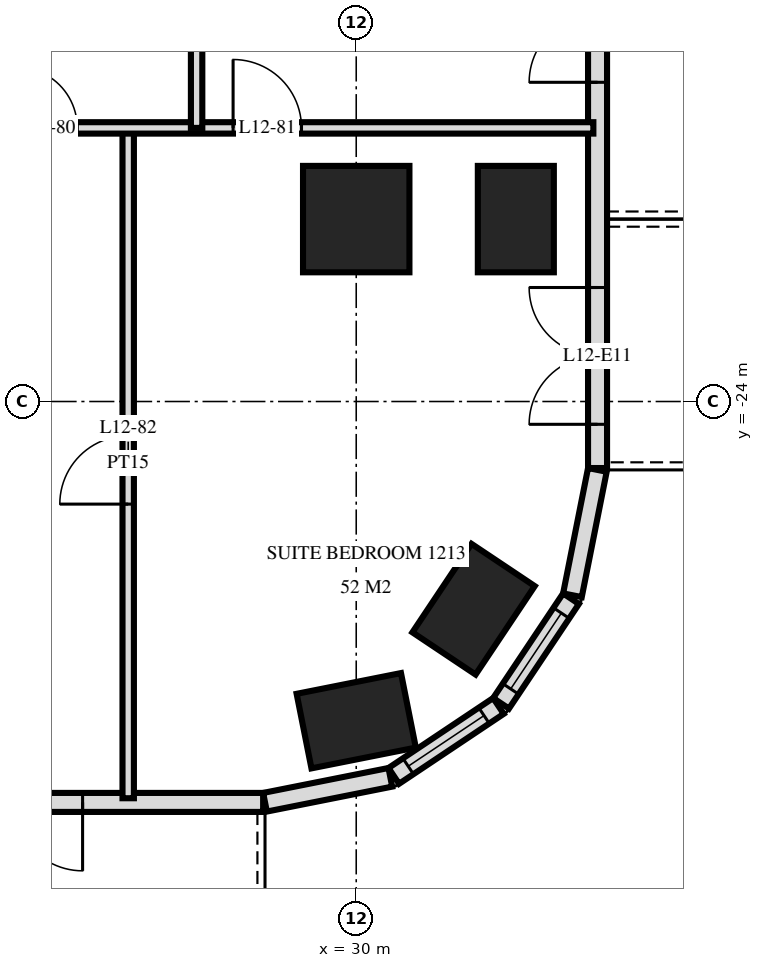
"""IFC4 building model, lengths in metres.
Left out: names, types, materials, properties, quantities, classifications, styles, units other than length and angle.
Written with IfcOpenShell. Run it as: python <this file> out.ifc"""

import sys

from ifc_helpers import new_model, si_unit, direction, frame, frame_2d, origin, origin_2d, place, context, subcontext, project, spatial, rectangle, extrude, element, fill, save


model = new_model("IFC4")
c1 = context("Model", 3, precision=1e-05, world=origin(), true_north=direction((0.0, 1.0)))
c2 = subcontext(c1, "Body", "Model", "MODEL_VIEW")
j1 = project(units=[si_unit("LENGTHUNIT", "METRE"), si_unit("PLANEANGLEUNIT", "RADIAN")], contexts=[c1])
p1 = place(None, origin())
s1 = spatial("IfcSite", under=j1, at=p1, CompositionType="ELEMENT")
p2 = place(p1, origin())
s2 = spatial("IfcBuilding", under=s1, at=p2, CompositionType="ELEMENT")
p3 = place(p2, frame((0.0, 0.0, 52.8)))
s3 = spatial("IfcBuildingStorey", under=s2, at=p3, CompositionType="ELEMENT", Elevation=52.8)
p4 = place(p3, frame((30.0, -28.2, 0.0), z_axis=(0.0, 0.0, 1.0), x_axis=(0.980792089743, 0.195056086032, 0.0)))
e1 = element("IfcColumn", 1, at=p4, inside=s3, PredefinedType="COLUMN", context=c2, shape_type="SweptSolid", body=[
    extrude(rectangle(XDim=1.4, YDim=1.0, at=origin_2d()), origin(), (0.0, 0.0, 1.0), 3.6),
])
p5 = place(p3, frame((30.0, -21.6, 0.0), z_axis=(0.0, 0.0, 1.0), x_axis=(1.0, 0.0, 0.0)))
e2 = element("IfcColumn", 2, at=p5, inside=s3, PredefinedType="COLUMN", context=c2, shape_type="SweptSolid", body=[
    extrude(rectangle(XDim=1.4, YDim=1.4, at=origin_2d()), origin(), (0.0, 0.0, 1.0), 3.6),
])
for number, where, z_axis, x_axis in (
    (3, (31.544, -26.733, 0.0), (0.0, 0.0, 1.0), (0.556, 0.831, 0.0)),
    (4, (32.1, -21.6, 0.0), (0.0, 0.0, 1.0), (0.0, 1.0, 0.0)),
):
    element("IfcColumn", number, at=place(p3, frame(where, z_axis=z_axis, x_axis=x_axis)), inside=s3, PredefinedType="COLUMN", context=c2, shape_type="SweptSolid", body=[
        extrude(rectangle(XDim=1.4, YDim=1.0, at=origin_2d()), origin(), (0.0, 0.0, 1.0), 3.6),
    ])
p6 = place(p3, frame((-28.775, -29.275, 0.0), z_axis=(0.0, 0.0, 1.0), x_axis=(1.0, 0.0, 0.0)))
e5 = element("IfcWall", 5, at=p6, inside=s3, PredefinedType="SOLIDWALL", context=c2, shape_type="SweptSolid", body=[
    extrude(rectangle(XDim=57.551, YDim=0.25, at=frame_2d((28.775, 0.0))), origin(), (0.0, 0.0, 1.0), 3.32),
])
p7 = place(p6, frame((0.575, 0.0, 0.0)))
e6 = element("IfcOpeningElement", 6, at=p7, cuts=e5, PredefinedType="OPENING", context=c2, shape_type="SweptSolid", body=[
    extrude(rectangle(XDim=1.8, YDim=2.4, at=frame_2d((0.9, 1.2))), frame((0.0, 0.135, 0.0), z_axis=(0.0, -1.0, 0.0), x_axis=(1.0, 0.0, 0.0)), (0.0, 0.0, 1.0), 0.27),
])
p8 = place(p6, frame((5.375, 0.0, 0.0)))
e7 = element("IfcOpeningElement", 7, at=p8, cuts=e5, PredefinedType="OPENING", context=c2, shape_type="SweptSolid", body=[
    extrude(rectangle(XDim=1.8, YDim=2.4, at=frame_2d((0.9, 1.2))), frame((0.0, 0.135, 0.0), z_axis=(0.0, -1.0, 0.0), x_axis=(1.0, 0.0, 0.0)), (0.0, 0.0, 1.0), 0.27),
])
p9 = place(p6, frame((8.075, 0.0, 0.3)))
e8 = element("IfcOpeningElement", 8, at=p9, cuts=e5, PredefinedType="OPENING", context=c2, shape_type="SweptSolid", body=[
    extrude(rectangle(XDim=2.4, YDim=2.1, at=frame_2d((1.2, 1.05))), frame((0.0, 0.135, 0.0), z_axis=(0.0, -1.0, 0.0), x_axis=(1.0, 0.0, 0.0)), (0.0, 0.0, 1.0), 0.27),
])
p10 = place(p6, frame((11.375, 0.0, 0.0)))
e9 = element("IfcOpeningElement", 9, at=p10, cuts=e5, PredefinedType="OPENING", context=c2, shape_type="SweptSolid", body=[
    extrude(rectangle(XDim=1.8, YDim=2.4, at=frame_2d((0.9, 1.2))), frame((0.0, 0.135, 0.0), z_axis=(0.0, -1.0, 0.0), x_axis=(1.0, 0.0, 0.0)), (0.0, 0.0, 1.0), 0.27),
])
p11 = place(p6, frame((14.075, 0.0, 0.3)))
e10 = element("IfcOpeningElement", 10, at=p11, cuts=e5, PredefinedType="OPENING", context=c2, shape_type="SweptSolid", body=[
    extrude(rectangle(XDim=2.4, YDim=2.1, at=frame_2d((1.2, 1.05))), frame((0.0, 0.135, 0.0), z_axis=(0.0, -1.0, 0.0), x_axis=(1.0, 0.0, 0.0)), (0.0, 0.0, 1.0), 0.27),
])
p12 = place(p6, frame((17.375, 0.0, 0.0)))
e11 = element("IfcOpeningElement", 11, at=p12, cuts=e5, PredefinedType="OPENING", context=c2, shape_type="SweptSolid", body=[
    extrude(rectangle(XDim=1.8, YDim=2.4, at=frame_2d((0.9, 1.2))), frame((0.0, 0.135, 0.0), z_axis=(0.0, -1.0, 0.0), x_axis=(1.0, 0.0, 0.0)), (0.0, 0.0, 1.0), 0.27),
])
p13 = place(p6, frame((20.075, 0.0, 0.3)))
e12 = element("IfcOpeningElement", 12, at=p13, cuts=e5, PredefinedType="OPENING", context=c2, shape_type="SweptSolid", body=[
    extrude(rectangle(XDim=2.4, YDim=2.1, at=frame_2d((1.2, 1.05))), frame((0.0, 0.135, 0.0), z_axis=(0.0, -1.0, 0.0), x_axis=(1.0, 0.0, 0.0)), (0.0, 0.0, 1.0), 0.27),
])
p14 = place(p6, frame((23.075, 0.0, 0.3)))
e13 = element("IfcOpeningElement", 13, at=p14, cuts=e5, PredefinedType="OPENING", context=c2, shape_type="SweptSolid", body=[
    extrude(rectangle(XDim=2.4, YDim=2.1, at=frame_2d((1.2, 1.05))), frame((0.0, 0.135, 0.0), z_axis=(0.0, -1.0, 0.0), x_axis=(1.0, 0.0, 0.0)), (0.0, 0.0, 1.0), 0.27),
])
p15 = place(p6, frame((26.375, 0.0, 0.0)))
e14 = element("IfcOpeningElement", 14, at=p15, cuts=e5, PredefinedType="OPENING", context=c2, shape_type="SweptSolid", body=[
    extrude(rectangle(XDim=1.8, YDim=2.4, at=frame_2d((0.9, 1.2))), frame((0.0, 0.135, 0.0), z_axis=(0.0, -1.0, 0.0), x_axis=(1.0, 0.0, 0.0)), (0.0, 0.0, 1.0), 0.27),
])
p16 = place(p6, frame((29.375, 0.0, 0.0)))
e15 = element("IfcOpeningElement", 15, at=p16, cuts=e5, PredefinedType="OPENING", context=c2, shape_type="SweptSolid", body=[
    extrude(rectangle(XDim=1.8, YDim=2.4, at=frame_2d((0.9, 1.2))), frame((0.0, 0.135, 0.0), z_axis=(0.0, -1.0, 0.0), x_axis=(1.0, 0.0, 0.0)), (0.0, 0.0, 1.0), 0.27),
])
p17 = place(p6, frame((32.075, 0.0, 0.3)))
e16 = element("IfcOpeningElement", 16, at=p17, cuts=e5, PredefinedType="OPENING", context=c2, shape_type="SweptSolid", body=[
    extrude(rectangle(XDim=2.4, YDim=2.1, at=frame_2d((1.2, 1.05))), frame((0.0, 0.135, 0.0), z_axis=(0.0, -1.0, 0.0), x_axis=(1.0, 0.0, 0.0)), (0.0, 0.0, 1.0), 0.27),
])
p18 = place(p6, frame((35.075, 0.0, 0.3)))
e17 = element("IfcOpeningElement", 17, at=p18, cuts=e5, PredefinedType="OPENING", context=c2, shape_type="SweptSolid", body=[
    extrude(rectangle(XDim=2.4, YDim=2.1, at=frame_2d((1.2, 1.05))), frame((0.0, 0.135, 0.0), z_axis=(0.0, -1.0, 0.0), x_axis=(1.0, 0.0, 0.0)), (0.0, 0.0, 1.0), 0.27),
])
p19 = place(p6, frame((38.375, 0.0, 0.0)))
e18 = element("IfcOpeningElement", 18, at=p19, cuts=e5, PredefinedType="OPENING", context=c2, shape_type="SweptSolid", body=[
    extrude(rectangle(XDim=1.8, YDim=2.4, at=frame_2d((0.9, 1.2))), frame((0.0, 0.135, 0.0), z_axis=(0.0, -1.0, 0.0), x_axis=(1.0, 0.0, 0.0)), (0.0, 0.0, 1.0), 0.27),
])
p20 = place(p6, frame((41.375, 0.0, 0.0)))
e19 = element("IfcOpeningElement", 19, at=p20, cuts=e5, PredefinedType="OPENING", context=c2, shape_type="SweptSolid", body=[
    extrude(rectangle(XDim=1.8, YDim=2.4, at=frame_2d((0.9, 1.2))), frame((0.0, 0.135, 0.0), z_axis=(0.0, -1.0, 0.0), x_axis=(1.0, 0.0, 0.0)), (0.0, 0.0, 1.0), 0.27),
])
p21 = place(p6, frame((44.075, 0.0, 0.3)))
e20 = element("IfcOpeningElement", 20, at=p21, cuts=e5, PredefinedType="OPENING", context=c2, shape_type="SweptSolid", body=[
    extrude(rectangle(XDim=2.4, YDim=2.1, at=frame_2d((1.2, 1.05))), frame((0.0, 0.135, 0.0), z_axis=(0.0, -1.0, 0.0), x_axis=(1.0, 0.0, 0.0)), (0.0, 0.0, 1.0), 0.27),
])
p22 = place(p6, frame((47.075, 0.0, 0.3)))
e21 = element("IfcOpeningElement", 21, at=p22, cuts=e5, PredefinedType="OPENING", context=c2, shape_type="SweptSolid", body=[
    extrude(rectangle(XDim=2.4, YDim=2.1, at=frame_2d((1.2, 1.05))), frame((0.0, 0.135, 0.0), z_axis=(0.0, -1.0, 0.0), x_axis=(1.0, 0.0, 0.0)), (0.0, 0.0, 1.0), 0.27),
])
p23 = place(p6, frame((50.375, 0.0, 0.0)))
e22 = element("IfcOpeningElement", 22, at=p23, cuts=e5, PredefinedType="OPENING", context=c2, shape_type="SweptSolid", body=[
    extrude(rectangle(XDim=1.8, YDim=2.4, at=frame_2d((0.9, 1.2))), frame((0.0, 0.135, 0.0), z_axis=(0.0, -1.0, 0.0), x_axis=(1.0, 0.0, 0.0)), (0.0, 0.0, 1.0), 0.27),
])
p24 = place(p6, frame((53.375, 0.0, 0.0)))
e23 = element("IfcOpeningElement", 23, at=p24, cuts=e5, PredefinedType="OPENING", context=c2, shape_type="SweptSolid", body=[
    extrude(rectangle(XDim=1.8, YDim=2.4, at=frame_2d((0.9, 1.2))), frame((0.0, 0.135, 0.0), z_axis=(0.0, -1.0, 0.0), x_axis=(1.0, 0.0, 0.0)), (0.0, 0.0, 1.0), 0.27),
])
p25 = place(p3, frame((28.8, -29.273, 0.0), z_axis=(0.0, 0.0, 1.0), x_axis=(0.980775640221, 0.19513878023, 0.0)))
e24 = element("IfcWall", 24, at=p25, inside=s3, PredefinedType="SOLIDWALL", context=c2, shape_type="SweptSolid", body=[
    extrude(rectangle(XDim=1.681, YDim=0.25, at=frame_2d((0.841, 0.0))), origin(), (0.0, 0.0, 1.0), 3.32),
])
p26 = place(p3, frame((30.494, -28.926, 0.0), z_axis=(0.0, 0.0, 1.0), x_axis=(0.831482937015, 0.55555029066, 0.0)))
e25 = element("IfcWall", 25, at=p26, inside=s3, PredefinedType="SOLIDWALL", context=c2, shape_type="SweptSolid", body=[
    extrude(rectangle(XDim=1.656, YDim=0.25, at=frame_2d((0.828, 0.0))), origin(), (0.0, 0.0, 1.0), 3.32),
])
p27 = place(p26, frame((0.228, 0.0, 0.9)))
e26 = element("IfcOpeningElement", 26, at=p27, cuts=e25, PredefinedType="OPENING", context=c2, shape_type="SweptSolid", body=[
    extrude(rectangle(XDim=1.2, YDim=1.5, at=frame_2d((0.6, 0.75))), frame((0.0, 0.135, 0.0), z_axis=(0.0, -1.0, 0.0), x_axis=(1.0, 0.0, 0.0)), (0.0, 0.0, 1.0), 0.27),
])
p28 = place(p3, frame((31.906, -27.971, 0.0), z_axis=(0.0, 0.0, 1.0), x_axis=(0.55555029066, 0.831482937015, 0.0)))
e27 = element("IfcWall", 27, at=p28, inside=s3, PredefinedType="SOLIDWALL", context=c2, shape_type="SweptSolid", body=[
    extrude(rectangle(XDim=1.656, YDim=0.25, at=frame_2d((0.828, 0.0))), origin(), (0.0, 0.0, 1.0), 3.32),
])
p29 = place(p28, frame((0.228, 0.0, 0.9)))
e28 = element("IfcOpeningElement", 28, at=p29, cuts=e27, PredefinedType="OPENING", context=c2, shape_type="SweptSolid", body=[
    extrude(rectangle(XDim=1.2, YDim=1.5, at=frame_2d((0.6, 0.75))), frame((0.0, 0.135, 0.0), z_axis=(0.0, -1.0, 0.0), x_axis=(1.0, 0.0, 0.0)), (0.0, 0.0, 1.0), 0.27),
])
p30 = place(p3, frame((32.844, -26.549, 0.0), z_axis=(0.0, 0.0, 1.0), x_axis=(0.195166572128, 0.980770110232, 0.0)))
e29 = element("IfcWall", 29, at=p30, inside=s3, PredefinedType="SOLIDWALL", context=c2, shape_type="SweptSolid", body=[
    extrude(rectangle(XDim=1.681, YDim=0.25, at=frame_2d((0.841, 0.0))), origin(), (0.0, 0.0, 1.0), 3.32),
])
p31 = place(p3, frame((33.175, -24.875, 0.0), z_axis=(0.0, 0.0, 1.0), x_axis=(0.0, 1.0, 0.0)))
e30 = element("IfcWall", 30, at=p31, inside=s3, PredefinedType="SOLIDWALL", context=c2, shape_type="SweptSolid", body=[
    extrude(rectangle(XDim=21.551, YDim=0.25, at=frame_2d((10.775, 0.0))), origin(), (0.0, 0.0, 1.0), 3.32),
])
p32 = place(p31, frame((0.575, 0.0, 0.0)))
e31 = element("IfcOpeningElement", 31, at=p32, cuts=e30, PredefinedType="OPENING", context=c2, shape_type="SweptSolid", body=[
    extrude(rectangle(XDim=1.8, YDim=2.4, at=frame_2d((0.9, 1.2))), frame((0.0, 0.135, 0.0), z_axis=(0.0, -1.0, 0.0), x_axis=(1.0, 0.0, 0.0)), (0.0, 0.0, 1.0), 0.27),
])
p33 = place(p31, frame((5.075, 0.0, 0.0)))
e32 = element("IfcOpeningElement", 32, at=p33, cuts=e30, PredefinedType="OPENING", context=c2, shape_type="SweptSolid", body=[
    extrude(rectangle(XDim=1.8, YDim=2.4, at=frame_2d((0.9, 1.2))), frame((0.0, 0.135, 0.0), z_axis=(0.0, -1.0, 0.0), x_axis=(1.0, 0.0, 0.0)), (0.0, 0.0, 1.0), 0.27),
])
p34 = place(p31, frame((8.075, 0.0, 0.3)))
e33 = element("IfcOpeningElement", 33, at=p34, cuts=e30, PredefinedType="OPENING", context=c2, shape_type="SweptSolid", body=[
    extrude(rectangle(XDim=1.2, YDim=2.1, at=frame_2d((0.6, 1.05))), frame((0.0, 0.135, 0.0), z_axis=(0.0, -1.0, 0.0), x_axis=(1.0, 0.0, 0.0)), (0.0, 0.0, 1.0), 0.27),
])
p35 = place(p31, frame((13.1, 0.0, 0.0)))
e34 = element("IfcOpeningElement", 34, at=p35, cuts=e30, PredefinedType="OPENING", context=c2, shape_type="SweptSolid", body=[
    extrude(rectangle(XDim=1.8, YDim=2.4, at=frame_2d((0.9, 1.2))), frame((0.0, 0.135, 0.0), z_axis=(0.0, -1.0, 0.0), x_axis=(1.0, 0.0, 0.0)), (0.0, 0.0, 1.0), 0.27),
])
p36 = place(p3, frame((27.9, -20.4, 0.0), z_axis=(0.0, 0.0, 1.0), x_axis=(0.0, 1.0, 0.0)))
e35 = element("IfcWall", 35, at=p36, inside=s3, PredefinedType="PARTITIONING", context=c2, shape_type="SweptSolid", body=[
    extrude(rectangle(XDim=3.0, YDim=0.15, at=frame_2d((1.5, 0.0))), origin(), (0.0, 0.0, 1.0), 3.32),
])
p37 = place(p3, frame((27.0, -29.22, 0.0), z_axis=(0.0, 0.0, 1.0), x_axis=(0.0, 1.0, 0.0)))
e36 = element("IfcWall", 36, at=p37, inside=s3, PredefinedType="PARTITIONING", context=c2, shape_type="SweptSolid", body=[
    extrude(rectangle(XDim=8.82, YDim=0.15, at=frame_2d((4.41, 0.0))), origin(), (0.0, 0.0, 1.0), 3.32),
])
p38 = place(p37, frame((3.87, 0.0, 0.0)))
e37 = element("IfcOpeningElement", 37, at=p38, cuts=e36, PredefinedType="OPENING", context=c2, shape_type="SweptSolid", body=[
    extrude(rectangle(XDim=0.9, YDim=2.1, at=frame_2d((0.45, 1.05))), frame((0.0, 0.085, 0.0), z_axis=(0.0, -1.0, 0.0), x_axis=(1.0, 0.0, 0.0)), (0.0, 0.0, 1.0), 0.17),
])
p39 = place(p3, frame((24.9, -20.4, 0.0), z_axis=(0.0, 0.0, 1.0), x_axis=(1.0, 0.0, 0.0)))
e38 = element("IfcWall", 38, at=p39, inside=s3, PredefinedType="PARTITIONING", context=c2, shape_type="SweptSolid", body=[
    extrude(rectangle(XDim=8.22, YDim=0.15, at=frame_2d((4.11, 0.0))), origin(), (0.0, 0.0, 1.0), 3.32),
])
p40 = place(p39, frame((0.63, 0.0, 0.0)))
e39 = element("IfcOpeningElement", 39, at=p40, cuts=e38, PredefinedType="OPENING", context=c2, shape_type="SweptSolid", body=[
    extrude(rectangle(XDim=0.8, YDim=2.1, at=frame_2d((0.4, 1.05))), frame((0.0, 0.085, 0.0), z_axis=(0.0, -1.0, 0.0), x_axis=(1.0, 0.0, 0.0)), (0.0, 0.0, 1.0), 0.17),
])
p41 = place(p39, frame((3.48, 0.0, 0.0)))
e40 = element("IfcOpeningElement", 40, at=p41, cuts=e38, PredefinedType="OPENING", context=c2, shape_type="SweptSolid", body=[
    extrude(rectangle(XDim=0.9, YDim=2.1, at=frame_2d((0.45, 1.05))), frame((0.0, 0.085, 0.0), z_axis=(0.0, -1.0, 0.0), x_axis=(1.0, 0.0, 0.0)), (0.0, 0.0, 1.0), 0.17),
])
p42 = place(p27, origin())
e41 = element("IfcWindow", 41, at=p42, inside=s3, PartitioningType="SINGLE_PANEL", PredefinedType="WINDOW", context=c2, shape_type="SweptSolid", body=[
    extrude(rectangle(XDim=1.2, YDim=1.5, at=frame_2d((0.6, 0.75))), frame((0.0, 0.03, 0.0), z_axis=(0.0, -1.0, 0.0), x_axis=(1.0, 0.0, 0.0)), (0.0, 0.0, 1.0), 0.06),
])
fill(e26, e41)
p43 = place(p29, origin())
e42 = element("IfcWindow", 42, at=p43, inside=s3, PartitioningType="SINGLE_PANEL", PredefinedType="WINDOW", context=c2, shape_type="SweptSolid", body=[
    extrude(rectangle(XDim=1.2, YDim=1.5, at=frame_2d((0.6, 0.75))), frame((0.0, 0.03, 0.0), z_axis=(0.0, -1.0, 0.0), x_axis=(1.0, 0.0, 0.0)), (0.0, 0.0, 1.0), 0.06),
])
fill(e28, e42)
p44 = place(p24, frame((0.9, 0.0, 0.0), z_axis=(0.0, 0.0, 1.0), x_axis=(-1.0, 0.0, 0.0)))
e43 = element("IfcDoor", 43, at=p44, inside=s3, OperationType="DOUBLE_DOOR_SINGLE_SWING", PredefinedType="DOOR", context=c2, shape_type="SweptSolid", body=[
    extrude(rectangle(XDim=1.8, YDim=2.4, at=frame_2d((0.0, 1.2))), frame((0.0, -0.025, 0.0), z_axis=(0.0, 1.0, 0.0), x_axis=(-1.0, 0.0, 0.0)), (0.0, 0.0, 1.0), 0.05),
])
fill(e23, e43)
p45 = place(p32, origin())
e44 = element("IfcDoor", 44, at=p45, inside=s3, OperationType="DOUBLE_DOOR_SINGLE_SWING", PredefinedType="DOOR", context=c2, shape_type="SweptSolid", body=[
    extrude(rectangle(XDim=1.8, YDim=2.4, at=frame_2d((0.9, 1.2))), frame((0.0, 0.025, 0.0), z_axis=(0.0, -1.0, 0.0), x_axis=(1.0, 0.0, 0.0)), (0.0, 0.0, 1.0), 0.05),
])
fill(e31, e44)
p46 = place(p33, origin())
e45 = element("IfcDoor", 45, at=p46, inside=s3, OperationType="DOUBLE_DOOR_SINGLE_SWING", PredefinedType="DOOR", context=c2, shape_type="SweptSolid", body=[
    extrude(rectangle(XDim=1.8, YDim=2.4, at=frame_2d((0.9, 1.2))), frame((0.0, 0.025, 0.0), z_axis=(0.0, -1.0, 0.0), x_axis=(1.0, 0.0, 0.0)), (0.0, 0.0, 1.0), 0.05),
])
fill(e32, e45)
p47 = place(p40, origin())
e46 = element("IfcDoor", 46, at=p47, inside=s3, OperationType="SINGLE_SWING_RIGHT", PredefinedType="DOOR", context=c2, shape_type="SweptSolid", body=[
    extrude(rectangle(XDim=0.8, YDim=2.1, at=frame_2d((0.4, 1.05))), frame((0.0, 0.025, 0.0), z_axis=(0.0, -1.0, 0.0), x_axis=(1.0, 0.0, 0.0)), (0.0, 0.0, 1.0), 0.05),
])
fill(e39, e46)
p48 = place(p41, origin())
e47 = element("IfcDoor", 47, at=p48, inside=s3, OperationType="SINGLE_SWING_RIGHT", PredefinedType="DOOR", context=c2, shape_type="SweptSolid", body=[
    extrude(rectangle(XDim=0.9, YDim=2.1, at=frame_2d((0.45, 1.05))), frame((0.0, 0.025, 0.0), z_axis=(0.0, -1.0, 0.0), x_axis=(1.0, 0.0, 0.0)), (0.0, 0.0, 1.0), 0.05),
])
fill(e40, e47)
p49 = place(p38, origin())
e48 = element("IfcDoor", 48, at=p49, inside=s3, OperationType="SINGLE_SWING_RIGHT", PredefinedType="DOOR", context=c2, shape_type="SweptSolid", body=[
    extrude(rectangle(XDim=0.9, YDim=2.1, at=frame_2d((0.45, 1.05))), frame((0.0, 0.025, 0.0), z_axis=(0.0, -1.0, 0.0), x_axis=(1.0, 0.0, 0.0)), (0.0, 0.0, 1.0), 0.05),
])
fill(e37, e48)
save(model, sys.argv[1])
